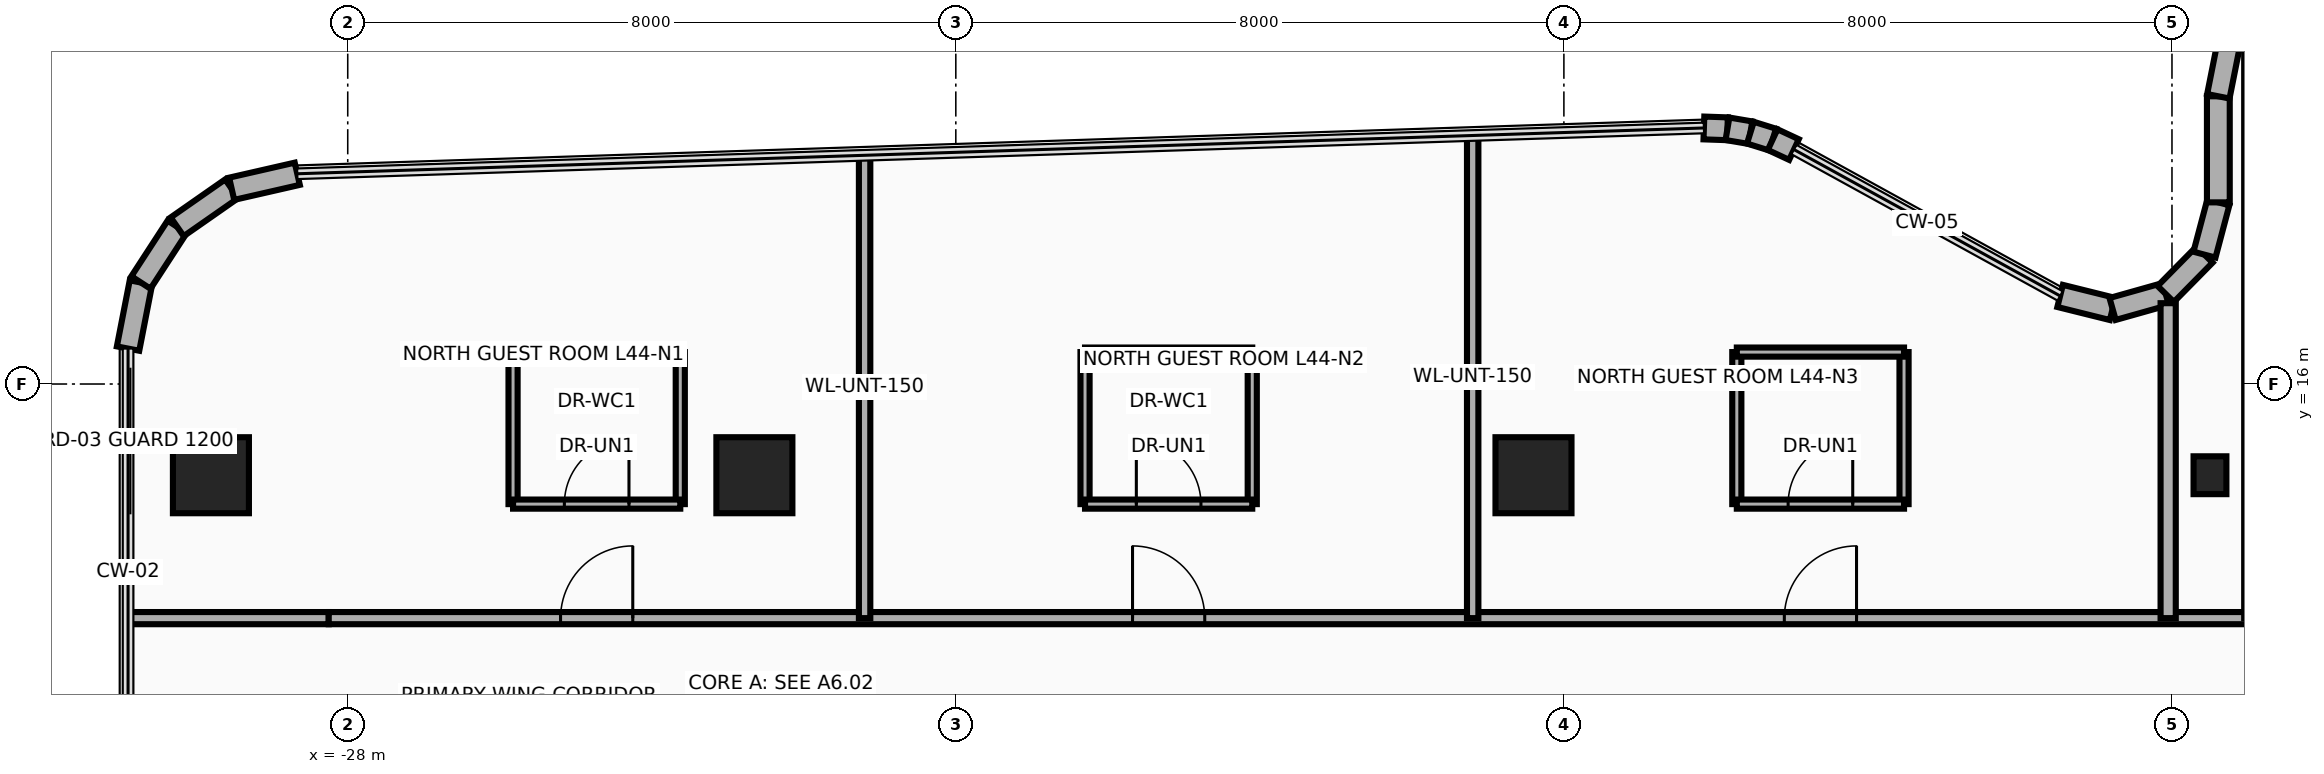
"""IFC4 building model, lengths in metres.
Left out: names, types, materials, properties, quantities, classifications, styles, units other than length and angle.
Written with IfcOpenShell. Run it as: python <this file> out.ifc"""

import sys

from ifc_helpers import new_model, si_unit, direction, frame, frame_2d, origin, origin_2d, place, context, subcontext, project, spatial, rectangle, i_section, extrude, source, transform, mapped, element, fill, save


model = new_model("IFC4")
c1 = context("Model", 3, precision=1e-05, world=origin(), true_north=direction((0.0, 1.0)))
c2 = subcontext(c1, "Body", "Model", "MODEL_VIEW")
j1 = project(units=[si_unit("LENGTHUNIT", "METRE"), si_unit("PLANEANGLEUNIT", "RADIAN")], contexts=[c1])
p1 = place(None, origin())
s1 = spatial("IfcSite", under=j1, at=p1, CompositionType="ELEMENT")
p2 = place(p1, origin())
s2 = spatial("IfcBuilding", under=s1, at=p2, CompositionType="ELEMENT")
p3 = place(p2, frame((0.0, 0.0, 172.3)))
s3 = spatial("IfcBuildingStorey", under=s2, at=p3, CompositionType="ELEMENT", Elevation=172.3)
m1 = source(origin(), c2, "Body", "SweptSolid", [
    extrude(rectangle(XDim=1.0, YDim=1.0, at=origin_2d()), origin(), (0.0, 0.0, 1.0), 4.25),
])
for number, where, z_axis, x_axis in (
    (1, (-29.8, 14.8, 0.0), (0.0, 0.0, 1.0), (1.0, 0.0, 0.0)),
    (2, (-22.65, 14.8, 0.0), (0.0, 0.0, 1.0), (1.0, 0.0, 0.0)),
    (3, (-12.4, 14.8, 0.0), (0.0, 0.0, 1.0), (1.0, 0.0, 0.0)),
):
    element("IfcColumn", number, at=place(p3, frame(where, z_axis=z_axis, x_axis=x_axis)), inside=s3, PredefinedType="COLUMN", context=c2, shape_type="MappedRepresentation", body=[
        mapped(m1, transform((0.0, 0.0, 0.0), x_axis=(1.0, 0.0, 0.0), y_axis=(0.0, 1.0, 0.0), z_axis=(0.0, 0.0, 1.0), scale=1.0)),
    ])
m2 = source(origin(), c2, "Body", "SweptSolid", [
    extrude(i_section(OverallWidth=0.432, OverallDepth=0.498, WebThickness=0.056, FlangeThickness=0.089, at=origin_2d()), origin(), (0.0, 0.0, 1.0), 4.25),
])
p4 = place(p3, frame((-3.5, 14.8, 0.0), z_axis=(0.0, 0.0, 1.0), x_axis=(1.0, 0.0, 0.0)))
e4 = element("IfcColumn", 4, at=p4, inside=s3, PredefinedType="COLUMN", context=c2, shape_type="MappedRepresentation", body=[
    mapped(m2, transform((0.0, 0.0, 0.0), x_axis=(1.0, 0.0, 0.0), y_axis=(0.0, 1.0, 0.0), z_axis=(0.0, 0.0, 1.0), scale=1.0)),
])
p5 = place(p3, frame((-30.89, 16.466, 0.0), z_axis=(0.0, 0.0, 1.0), x_axis=(0.191128020887, 0.981565117367, 0.0)))
e5 = element("IfcWall", 5, at=p5, inside=s3, PredefinedType="SOLIDWALL", context=c2, shape_type="SweptSolid", body=[
    extrude(rectangle(XDim=0.885, YDim=0.3, at=frame_2d((0.443, 0.0))), origin(), (0.0, 0.0, 1.0), 3.93),
])
p6 = place(p3, frame((-30.721, 17.335, 0.0), z_axis=(0.0, 0.0, 1.0), x_axis=(0.545322000684, 0.838226649284, 0.0)))
e6 = element("IfcWall", 6, at=p6, inside=s3, PredefinedType="SOLIDWALL", context=c2, shape_type="SweptSolid", body=[
    extrude(rectangle(XDim=0.874, YDim=0.3, at=frame_2d((0.437, 0.0))), origin(), (0.0, 0.0, 1.0), 3.93),
])
p7 = place(p3, frame((-30.244, 18.068, 0.0), z_axis=(0.0, 0.0, 1.0), x_axis=(0.820005059444, 0.572356272339, 0.0)))
e7 = element("IfcWall", 7, at=p7, inside=s3, PredefinedType="SOLIDWALL", context=c2, shape_type="SweptSolid", body=[
    extrude(rectangle(XDim=0.875, YDim=0.3, at=frame_2d((0.437, 0.0))), origin(), (0.0, 0.0, 1.0), 3.93),
])
p8 = place(p3, frame((-29.527, 18.569, 0.0), z_axis=(0.0, 0.0, 1.0), x_axis=(0.974798570829, 0.223086858218, 0.0)))
e8 = element("IfcWall", 8, at=p8, inside=s3, PredefinedType="SOLIDWALL", context=c2, shape_type="SweptSolid", body=[
    extrude(rectangle(XDim=0.885, YDim=0.3, at=frame_2d((0.443, 0.0))), origin(), (0.0, 0.0, 1.0), 3.93),
])
p9 = place(p3, frame((-10.158, 19.368, 0.0), z_axis=(0.0, 0.0, 1.0), x_axis=(0.999425494718, -0.03389218949, 0.0)))
e9 = element("IfcWall", 9, at=p9, inside=s3, PredefinedType="SOLIDWALL", context=c2, shape_type="SweptSolid", body=[
    extrude(rectangle(XDim=0.31, YDim=0.3, at=frame_2d((0.155, 0.0))), origin(), (0.0, 0.0, 1.0), 3.93),
])
for number, where, z_axis, x_axis in (
    (10, (-9.848, 19.358, 0.0), (0.0, 0.0, 1.0), (0.986, -0.167, 0.0)),
    (11, (-9.546, 19.307, 0.0), (0.0, 0.0, 1.0), (0.955, -0.297, 0.0)),
):
    element("IfcWall", number, at=place(p3, frame(where, z_axis=z_axis, x_axis=x_axis)), inside=s3, PredefinedType="SOLIDWALL", context=c2, shape_type="SweptSolid", body=[
        extrude(rectangle(XDim=0.306, YDim=0.3, at=frame_2d((0.153, 0.0))), origin(), (0.0, 0.0, 1.0), 3.93),
    ])
p10 = place(p3, frame((-9.254, 19.216, 0.0), z_axis=(0.0, 0.0, 1.0), x_axis=(0.906524902388, -0.42215234377, 0.0)))
e12 = element("IfcWall", 12, at=p10, inside=s3, PredefinedType="SOLIDWALL", context=c2, shape_type="SweptSolid", body=[
    extrude(rectangle(XDim=0.31, YDim=0.3, at=frame_2d((0.155, 0.0))), origin(), (0.0, 0.0, 1.0), 3.93),
])
p11 = place(p3, frame((-5.472, 17.159, 0.0), z_axis=(0.0, 0.0, 1.0), x_axis=(0.970564820059, -0.240840050789, 0.0)))
e13 = element("IfcWall", 13, at=p11, inside=s3, PredefinedType="SOLIDWALL", context=c2, shape_type="SweptSolid", body=[
    extrude(rectangle(XDim=0.712, YDim=0.3, at=frame_2d((0.356, 0.0))), origin(), (0.0, 0.0, 1.0), 3.93),
])
p12 = place(p3, frame((-4.781, 16.987, 0.0), z_axis=(0.0, 0.0, 1.0), x_axis=(0.962494705656, 0.271300463662, 0.0)))
e14 = element("IfcWall", 14, at=p12, inside=s3, PredefinedType="SOLIDWALL", context=c2, shape_type="SweptSolid", body=[
    extrude(rectangle(XDim=0.726, YDim=0.3, at=frame_2d((0.363, 0.0))), origin(), (0.0, 0.0, 1.0), 3.93),
])
p13 = place(p3, frame((-4.082, 17.184, 0.0), z_axis=(0.0, 0.0, 1.0), x_axis=(0.701538604215, 0.712631452293, 0.0)))
e15 = element("IfcWall", 15, at=p13, inside=s3, PredefinedType="SOLIDWALL", context=c2, shape_type="SweptSolid", body=[
    extrude(rectangle(XDim=0.726, YDim=0.3, at=frame_2d((0.363, 0.0))), origin(), (0.0, 0.0, 1.0), 2.915),
])
p14 = place(p3, frame((-3.573, 17.702, 0.0), z_axis=(0.0, 0.0, 1.0), x_axis=(0.256637481794, 0.966507735581, 0.0)))
e16 = element("IfcWall", 16, at=p14, inside=s3, PredefinedType="SOLIDWALL", context=c2, shape_type="SweptSolid", body=[
    extrude(rectangle(XDim=0.712, YDim=0.3, at=frame_2d((0.356, 0.0))), origin(), (0.0, 0.0, 1.0), 2.915),
])
p15 = place(p3, frame((-3.39, 18.39, 0.0), z_axis=(0.0, 0.0, 1.0), x_axis=(0.0, 1.0, 0.0)))
e17 = element("IfcWall", 17, at=p15, inside=s3, PredefinedType="SOLIDWALL", context=c2, shape_type="SweptSolid", body=[
    extrude(rectangle(XDim=1.396, YDim=0.3, at=frame_2d((0.698, 0.0))), origin(), (0.0, 0.0, 1.0), 2.915),
])
p16 = place(p3, frame((-3.39, 19.785, 0.0), z_axis=(0.0, 0.0, 1.0), x_axis=(0.195094354541, 0.980784478276, 0.0)))
e18 = element("IfcWall", 18, at=p16, inside=s3, PredefinedType="SOLIDWALL", context=c2, shape_type="SweptSolid", body=[
    extrude(rectangle(XDim=0.827, YDim=0.3, at=frame_2d((0.414, 0.0))), origin(), (0.0, 0.0, 1.0), 2.915),
])
p17 = place(p3, frame((-30.89, 12.92, 0.0), z_axis=(0.0, 0.0, 1.0), x_axis=(1.0, 0.0, 0.0)))
e19 = element("IfcWall", 19, at=p17, inside=s3, PredefinedType="PARTITIONING", context=c2, shape_type="SweptSolid", body=[
    extrude(rectangle(XDim=2.64, YDim=0.16, at=frame_2d((1.32, 0.0))), origin(), (0.0, 0.0, 1.0), 3.376),
])
p18 = place(p3, frame((-28.25, 12.92, 0.0), z_axis=(0.0, 0.0, 1.0), x_axis=(1.0, 0.0, 0.0)))
e20 = element("IfcWall", 20, at=p18, inside=s3, PredefinedType="PARTITIONING", context=c2, shape_type="SweptSolid", body=[
    extrude(rectangle(XDim=36.75, YDim=0.16, at=frame_2d((18.375, 0.0))), origin(), (0.0, 0.0, 1.0), 2.915),
])
p19 = place(p18, frame((3.05, 0.0, 0.0)))
e21 = element("IfcOpeningElement", 21, at=p19, cuts=e20, PredefinedType="OPENING", context=c2, shape_type="SweptSolid", body=[
    extrude(rectangle(XDim=0.95, YDim=2.15, at=frame_2d((0.475, 1.075))), frame((0.0, 0.095, 0.0), z_axis=(0.0, -1.0, 0.0), x_axis=(1.0, 0.0, 0.0)), (0.0, 0.0, 1.0), 0.19),
])
p20 = place(p18, frame((10.575, 0.0, 0.0)))
e22 = element("IfcOpeningElement", 22, at=p20, cuts=e20, PredefinedType="OPENING", context=c2, shape_type="SweptSolid", body=[
    extrude(rectangle(XDim=0.95, YDim=2.15, at=frame_2d((0.475, 1.075))), frame((0.0, 0.095, 0.0), z_axis=(0.0, -1.0, 0.0), x_axis=(1.0, 0.0, 0.0)), (0.0, 0.0, 1.0), 0.19),
])
p21 = place(p18, frame((19.15, 0.0, 0.0)))
e23 = element("IfcOpeningElement", 23, at=p21, cuts=e20, PredefinedType="OPENING", context=c2, shape_type="SweptSolid", body=[
    extrude(rectangle(XDim=0.95, YDim=2.15, at=frame_2d((0.475, 1.075))), frame((0.0, 0.095, 0.0), z_axis=(0.0, -1.0, 0.0), x_axis=(1.0, 0.0, 0.0)), (0.0, 0.0, 1.0), 0.19),
])
p22 = place(p18, frame((27.55, 0.0, 0.0)))
e24 = element("IfcOpeningElement", 24, at=p22, cuts=e20, PredefinedType="OPENING", context=c2, shape_type="SweptSolid", body=[
    extrude(rectangle(XDim=0.95, YDim=2.15, at=frame_2d((0.475, 1.075))), frame((0.0, 0.095, 0.0), z_axis=(0.0, -1.0, 0.0), x_axis=(1.0, 0.0, 0.0)), (0.0, 0.0, 1.0), 0.19),
])
p23 = place(p18, frame((33.981, 0.0, 0.0)))
e25 = element("IfcOpeningElement", 25, at=p23, cuts=e20, PredefinedType="OPENING", context=c2, shape_type="SweptSolid", body=[
    extrude(rectangle(XDim=0.95, YDim=2.15, at=frame_2d((0.475, 1.075))), frame((0.0, 0.095, 0.0), z_axis=(0.0, -1.0, 0.0), x_axis=(1.0, 0.0, 0.0)), (0.0, 0.0, 1.0), 0.19),
])
p24 = place(p3, frame((-4.05, 12.92, 0.0), z_axis=(0.0, 0.0, 1.0), x_axis=(0.0, 1.0, 0.0)))
e26 = element("IfcWall", 26, at=p24, inside=s3, PredefinedType="PARTITIONING", context=c2, shape_type="SweptSolid", body=[
    extrude(rectangle(XDim=4.144, YDim=0.2, at=frame_2d((2.072, 0.0))), origin(), (0.0, 0.0, 1.0), 2.715),
])
p25 = place(p3, frame((-21.2, 12.92, 0.0), z_axis=(0.0, 0.0, 1.0), x_axis=(0.0, 1.0, 0.0)))
e27 = element("IfcWall", 27, at=p25, inside=s3, PredefinedType="PARTITIONING", context=c2, shape_type="SweptSolid", body=[
    extrude(rectangle(XDim=6.089, YDim=0.15, at=frame_2d((3.044, 0.0))), origin(), (0.0, 0.0, 1.0), 2.965),
])
p26 = place(p3, frame((-13.2, 12.92, 0.0), z_axis=(0.0, 0.0, 1.0), x_axis=(0.0, 1.0, 0.0)))
e28 = element("IfcWall", 28, at=p26, inside=s3, PredefinedType="PARTITIONING", context=c2, shape_type="SweptSolid", body=[
    extrude(rectangle(XDim=6.35, YDim=0.15, at=frame_2d((3.175, 0.0))), origin(), (0.0, 0.0, 1.0), 2.965),
])
for number, where, z_axis, x_axis in (
    (29, (-25.825, 14.42, 0.0), (0.0, 0.0, 1.0), (0.0, 1.0, 0.0)),
    (30, (-23.625, 14.42, 0.0), (0.0, 0.0, 1.0), (0.0, 1.0, 0.0)),
):
    element("IfcWall", number, at=place(p3, frame(where, z_axis=z_axis, x_axis=x_axis)), inside=s3, PredefinedType="PARTITIONING", context=c2, shape_type="SweptSolid", body=[
        extrude(rectangle(XDim=2.0, YDim=0.12, at=frame_2d((1.0, 0.0))), origin(), (0.0, 0.0, 1.0), 2.965),
    ])
p27 = place(p3, frame((-25.825, 16.42, 0.0), z_axis=(0.0, 0.0, 1.0), x_axis=(1.0, 0.0, 0.0)))
e31 = element("IfcWall", 31, at=p27, inside=s3, PredefinedType="PARTITIONING", context=c2, shape_type="SweptSolid", body=[
    extrude(rectangle(XDim=2.2, YDim=0.12, at=frame_2d((1.1, 0.0))), origin(), (0.0, 0.0, 1.0), 3.93),
])
p28 = place(p3, frame((-25.825, 14.42, 0.0), z_axis=(0.0, 0.0, 1.0), x_axis=(1.0, 0.0, 0.0)))
e32 = element("IfcWall", 32, at=p28, inside=s3, PredefinedType="PARTITIONING", context=c2, shape_type="SweptSolid", body=[
    extrude(rectangle(XDim=2.2, YDim=0.12, at=frame_2d((1.1, 0.0))), origin(), (0.0, 0.0, 1.0), 3.93),
])
p29 = place(p28, frame((0.675, 0.0, 0.0)))
e33 = element("IfcOpeningElement", 33, at=p29, cuts=e32, PredefinedType="OPENING", context=c2, shape_type="SweptSolid", body=[
    extrude(rectangle(XDim=0.85, YDim=2.1, at=frame_2d((0.425, 1.05))), frame((0.0, 0.075, 0.0), z_axis=(0.0, -1.0, 0.0), x_axis=(1.0, 0.0, 0.0)), (0.0, 0.0, 1.0), 0.15),
])
for number, where, z_axis, x_axis in (
    (34, (-18.3, 14.42, 0.0), (0.0, 0.0, 1.0), (0.0, 1.0, 0.0)),
    (35, (-16.1, 14.42, 0.0), (0.0, 0.0, 1.0), (0.0, 1.0, 0.0)),
):
    element("IfcWall", number, at=place(p3, frame(where, z_axis=z_axis, x_axis=x_axis)), inside=s3, PredefinedType="PARTITIONING", context=c2, shape_type="SweptSolid", body=[
        extrude(rectangle(XDim=2.0, YDim=0.12, at=frame_2d((1.0, 0.0))), origin(), (0.0, 0.0, 1.0), 2.965),
    ])
p30 = place(p3, frame((-18.3, 16.42, 0.0), z_axis=(0.0, 0.0, 1.0), x_axis=(1.0, 0.0, 0.0)))
e36 = element("IfcWall", 36, at=p30, inside=s3, PredefinedType="PARTITIONING", context=c2, shape_type="SweptSolid", body=[
    extrude(rectangle(XDim=2.2, YDim=0.12, at=frame_2d((1.1, 0.0))), origin(), (0.0, 0.0, 1.0), 3.93),
])
p31 = place(p3, frame((-18.3, 14.42, 0.0), z_axis=(0.0, 0.0, 1.0), x_axis=(1.0, 0.0, 0.0)))
e37 = element("IfcWall", 37, at=p31, inside=s3, PredefinedType="PARTITIONING", context=c2, shape_type="SweptSolid", body=[
    extrude(rectangle(XDim=2.2, YDim=0.12, at=frame_2d((1.1, 0.0))), origin(), (0.0, 0.0, 1.0), 3.93),
])
p32 = place(p31, frame((0.675, 0.0, 0.0)))
e38 = element("IfcOpeningElement", 38, at=p32, cuts=e37, PredefinedType="OPENING", context=c2, shape_type="SweptSolid", body=[
    extrude(rectangle(XDim=0.85, YDim=2.1, at=frame_2d((0.425, 1.05))), frame((0.0, 0.075, 0.0), z_axis=(0.0, -1.0, 0.0), x_axis=(1.0, 0.0, 0.0)), (0.0, 0.0, 1.0), 0.15),
])
for number, where, z_axis, x_axis in (
    (39, (-9.725, 14.42, 0.0), (0.0, 0.0, 1.0), (0.0, 1.0, 0.0)),
    (40, (-7.525, 14.42, 0.0), (0.0, 0.0, 1.0), (0.0, 1.0, 0.0)),
):
    element("IfcWall", number, at=place(p3, frame(where, z_axis=z_axis, x_axis=x_axis)), inside=s3, PredefinedType="PARTITIONING", context=c2, shape_type="SweptSolid", body=[
        extrude(rectangle(XDim=2.0, YDim=0.12, at=frame_2d((1.0, 0.0))), origin(), (0.0, 0.0, 1.0), 2.715),
    ])
p33 = place(p3, frame((-9.725, 16.42, 0.0), z_axis=(0.0, 0.0, 1.0), x_axis=(1.0, 0.0, 0.0)))
e41 = element("IfcWall", 41, at=p33, inside=s3, PredefinedType="PARTITIONING", context=c2, shape_type="SweptSolid", body=[
    extrude(rectangle(XDim=2.2, YDim=0.12, at=frame_2d((1.1, 0.0))), origin(), (0.0, 0.0, 1.0), 3.93),
])
p34 = place(p3, frame((-9.725, 14.42, 0.0), z_axis=(0.0, 0.0, 1.0), x_axis=(1.0, 0.0, 0.0)))
e42 = element("IfcWall", 42, at=p34, inside=s3, PredefinedType="PARTITIONING", context=c2, shape_type="SweptSolid", body=[
    extrude(rectangle(XDim=2.2, YDim=0.12, at=frame_2d((1.1, 0.0))), origin(), (0.0, 0.0, 1.0), 2.715),
])
p35 = place(p34, frame((0.675, 0.0, 0.0)))
e43 = element("IfcOpeningElement", 43, at=p35, cuts=e42, PredefinedType="OPENING", context=c2, shape_type="SweptSolid", body=[
    extrude(rectangle(XDim=0.85, YDim=2.1, at=frame_2d((0.425, 1.05))), frame((0.0, 0.075, 0.0), z_axis=(0.0, -1.0, 0.0), x_axis=(1.0, 0.0, 0.0)), (0.0, 0.0, 1.0), 0.15),
])
p36 = place(p19, origin())
e44 = element("IfcDoor", 44, at=p36, inside=s3, OperationType="SINGLE_SWING_RIGHT", PredefinedType="DOOR", context=c2, shape_type="SweptSolid", body=[
    extrude(rectangle(XDim=0.95, YDim=2.15, at=frame_2d((0.475, 1.075))), frame((0.0, 0.025, 0.0), z_axis=(0.0, -1.0, 0.0), x_axis=(1.0, 0.0, 0.0)), (0.0, 0.0, 1.0), 0.05),
])
fill(e21, e44)
p37 = place(p29, origin())
e45 = element("IfcDoor", 45, at=p37, inside=s3, OperationType="SINGLE_SWING_LEFT", PredefinedType="DOOR", context=c2, shape_type="SweptSolid", body=[
    extrude(rectangle(XDim=0.85, YDim=2.1, at=frame_2d((0.425, 1.05))), frame((0.0, 0.025, 0.0), z_axis=(0.0, -1.0, 0.0), x_axis=(1.0, 0.0, 0.0)), (0.0, 0.0, 1.0), 0.05),
])
fill(e33, e45)
p38 = place(p20, origin())
e46 = element("IfcDoor", 46, at=p38, inside=s3, OperationType="SINGLE_SWING_RIGHT", PredefinedType="DOOR", context=c2, shape_type="SweptSolid", body=[
    extrude(rectangle(XDim=0.95, YDim=2.15, at=frame_2d((0.475, 1.075))), frame((0.0, 0.025, 0.0), z_axis=(0.0, -1.0, 0.0), x_axis=(1.0, 0.0, 0.0)), (0.0, 0.0, 1.0), 0.05),
])
fill(e22, e46)
p39 = place(p32, origin())
e47 = element("IfcDoor", 47, at=p39, inside=s3, OperationType="SINGLE_SWING_LEFT", PredefinedType="DOOR", context=c2, shape_type="SweptSolid", body=[
    extrude(rectangle(XDim=0.85, YDim=2.1, at=frame_2d((0.425, 1.05))), frame((0.0, 0.025, 0.0), z_axis=(0.0, -1.0, 0.0), x_axis=(1.0, 0.0, 0.0)), (0.0, 0.0, 1.0), 0.05),
])
fill(e38, e47)
p40 = place(p21, origin())
e48 = element("IfcDoor", 48, at=p40, inside=s3, OperationType="SINGLE_SWING_RIGHT", PredefinedType="DOOR", context=c2, shape_type="SweptSolid", body=[
    extrude(rectangle(XDim=0.95, YDim=2.15, at=frame_2d((0.475, 1.075))), frame((0.0, 0.025, 0.0), z_axis=(0.0, -1.0, 0.0), x_axis=(1.0, 0.0, 0.0)), (0.0, 0.0, 1.0), 0.05),
])
fill(e23, e48)
p41 = place(p35, origin())
e49 = element("IfcDoor", 49, at=p41, inside=s3, OperationType="SINGLE_SWING_LEFT", PredefinedType="DOOR", context=c2, shape_type="SweptSolid", body=[
    extrude(rectangle(XDim=0.85, YDim=2.1, at=frame_2d((0.425, 1.05))), frame((0.0, 0.025, 0.0), z_axis=(0.0, -1.0, 0.0), x_axis=(1.0, 0.0, 0.0)), (0.0, 0.0, 1.0), 0.05),
])
fill(e43, e49)
save(model, sys.argv[1])
